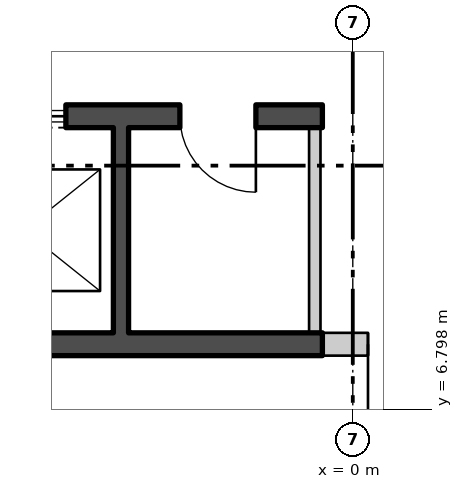
"""IFC4 building model, lengths in metres.
Left out: names, types, materials, properties, quantities, classifications, styles, units other than length and angle.
Written with IfcOpenShell. Run it as: python <this file> out.ifc"""

import sys

from ifc_helpers import new_model, si_unit, direction, frame, frame_2d, origin, place, context, subcontext, project, spatial, rectangle, extrude, element, fill, save


model = new_model("IFC4")
c1 = context("Model", 3, precision=1e-05, world=origin(), true_north=direction((0.0, 1.0)))
c2 = subcontext(c1, "Body", "Model", "MODEL_VIEW")
j1 = project(units=[si_unit("LENGTHUNIT", "METRE"), si_unit("PLANEANGLEUNIT", "RADIAN")], contexts=[c1])
p1 = place(None, origin())
s1 = spatial("IfcSite", under=j1, at=p1, CompositionType="ELEMENT")
p2 = place(p1, origin())
s2 = spatial("IfcBuilding", under=s1, at=p2, CompositionType="ELEMENT")
p3 = place(p2, frame((0.0, 0.0, 151.5)))
s3 = spatial("IfcBuildingStorey", under=s2, at=p3, CompositionType="ELEMENT", Elevation=151.5)
p4 = place(p3, frame((-10.7, 10.65, 0.0), z_axis=(0.0, 0.0, 1.0), x_axis=(1.0, 0.0, 0.0)))
e1 = element("IfcWall", 1, at=p4, inside=s3, PredefinedType="SHEAR", context=c2, shape_type="SweptSolid", body=[
    extrude(rectangle(XDim=10.3, YDim=0.3, at=frame_2d((5.15, 0.0))), origin(), (0.0, 0.0, 1.0), 3.7),
])
p5 = place(p4, frame((0.675, 0.0, 0.0)))
e2 = element("IfcOpeningElement", 2, at=p5, cuts=e1, PredefinedType="OPENING", context=c2, shape_type="SweptSolid", body=[
    extrude(rectangle(XDim=1.1, YDim=2.1, at=frame_2d((0.55, 1.05))), frame((0.0, 0.16, 0.0), z_axis=(0.0, -1.0, 0.0), x_axis=(1.0, 0.0, 0.0)), (0.0, 0.0, 1.0), 0.32),
])
p6 = place(p4, frame((3.275, 0.0, 0.0)))
e3 = element("IfcOpeningElement", 3, at=p6, cuts=e1, PredefinedType="OPENING", context=c2, shape_type="SweptSolid", body=[
    extrude(rectangle(XDim=1.1, YDim=2.1, at=frame_2d((0.55, 1.05))), frame((0.0, 0.16, 0.0), z_axis=(0.0, -1.0, 0.0), x_axis=(1.0, 0.0, 0.0)), (0.0, 0.0, 1.0), 0.32),
])
p7 = place(p4, frame((5.825, 0.0, 0.0)))
e4 = element("IfcOpeningElement", 4, at=p7, cuts=e1, PredefinedType="OPENING", context=c2, shape_type="SweptSolid", body=[
    extrude(rectangle(XDim=1.1, YDim=2.1, at=frame_2d((0.55, 1.05))), frame((0.0, 0.16, 0.0), z_axis=(0.0, -1.0, 0.0), x_axis=(1.0, 0.0, 0.0)), (0.0, 0.0, 1.0), 0.32),
])
p8 = place(p4, frame((8.425, 0.0, 0.0)))
e5 = element("IfcOpeningElement", 5, at=p8, cuts=e1, PredefinedType="OPENING", context=c2, shape_type="SweptSolid", body=[
    extrude(rectangle(XDim=1.0, YDim=2.1, at=frame_2d((0.5, 1.05))), frame((0.0, 0.16, 0.0), z_axis=(0.0, -1.0, 0.0), x_axis=(1.0, 0.0, 0.0)), (0.0, 0.0, 1.0), 0.32),
])
p9 = place(p3, frame((-10.7, 7.65, 0.0), z_axis=(0.0, 0.0, 1.0), x_axis=(1.0, 0.0, 0.0)))
e6 = element("IfcWall", 6, at=p9, inside=s3, PredefinedType="SHEAR", context=c2, shape_type="SweptSolid", body=[
    extrude(rectangle(XDim=10.3, YDim=0.3, at=frame_2d((5.15, 0.0))), origin(), (0.0, 0.0, 1.0), 3.7),
])
p10 = place(p3, frame((-3.05, 7.8, 0.0), z_axis=(0.0, 0.0, 1.0), x_axis=(0.0, 1.0, 0.0)))
e7 = element("IfcWall", 7, at=p10, inside=s3, PredefinedType="SHEAR", context=c2, shape_type="SweptSolid", body=[
    extrude(rectangle(XDim=2.7, YDim=0.2, at=frame_2d((1.35, 0.0))), origin(), (0.0, 0.0, 1.0), 3.7),
])
p11 = place(p3, frame((-0.5, 7.8, 0.0), z_axis=(0.0, 0.0, 1.0), x_axis=(0.0, 1.0, 0.0)))
e8 = element("IfcWall", 8, at=p11, inside=s3, PredefinedType="PARTITIONING", context=c2, shape_type="SweptSolid", body=[
    extrude(rectangle(XDim=2.7, YDim=0.15, at=frame_2d((1.35, 0.0))), origin(), (0.0, 0.0, 1.0), 3.7),
])
p12 = place(p3, frame((-0.4, 7.65, 0.0), z_axis=(0.0, 0.0, 1.0), x_axis=(1.0, 0.0, 0.0)))
e9 = element("IfcWall", 9, at=p12, inside=s3, PredefinedType="PARTITIONING", context=c2, shape_type="SweptSolid", body=[
    extrude(rectangle(XDim=3.0, YDim=0.3, at=frame_2d((1.5, 0.0))), origin(), (0.0, 0.0, 1.0), 3.7),
])
p13 = place(p12, frame((0.6, 0.0, 0.0)))
e10 = element("IfcOpeningElement", 10, at=p13, cuts=e9, PredefinedType="OPENING", context=c2, shape_type="SweptSolid", body=[
    extrude(rectangle(XDim=1.8, YDim=2.4, at=frame_2d((0.9, 1.2))), frame((0.0, 0.16, 0.0), z_axis=(0.0, -1.0, 0.0), x_axis=(1.0, 0.0, 0.0)), (0.0, 0.0, 1.0), 0.32),
])
p14 = place(p7, origin())
e11 = element("IfcDoor", 11, at=p14, inside=s3, OperationType="SLIDING_TO_LEFT", PredefinedType="DOOR", context=c2, shape_type="SweptSolid", body=[
    extrude(rectangle(XDim=1.1, YDim=2.1, at=frame_2d((0.55, 1.05))), frame((0.0, 0.025, 0.0), z_axis=(0.0, -1.0, 0.0), x_axis=(1.0, 0.0, 0.0)), (0.0, 0.0, 1.0), 0.05),
])
fill(e4, e11)
p15 = place(p8, origin())
e12 = element("IfcDoor", 12, at=p15, inside=s3, OperationType="SINGLE_SWING_RIGHT", PredefinedType="DOOR", context=c2, shape_type="SweptSolid", body=[
    extrude(rectangle(XDim=1.0, YDim=2.1, at=frame_2d((0.5, 1.05))), frame((0.0, 0.025, 0.0), z_axis=(0.0, -1.0, 0.0), x_axis=(1.0, 0.0, 0.0)), (0.0, 0.0, 1.0), 0.05),
])
fill(e5, e12)
p16 = place(p13, origin())
e13 = element("IfcDoor", 13, at=p16, inside=s3, OperationType="DOUBLE_DOOR_SINGLE_SWING", PredefinedType="DOOR", context=c2, shape_type="SweptSolid", body=[
    extrude(rectangle(XDim=1.8, YDim=2.4, at=frame_2d((0.9, 1.2))), frame((0.0, 0.025, 0.0), z_axis=(0.0, -1.0, 0.0), x_axis=(1.0, 0.0, 0.0)), (0.0, 0.0, 1.0), 0.05),
])
fill(e10, e13)
save(model, sys.argv[1])
